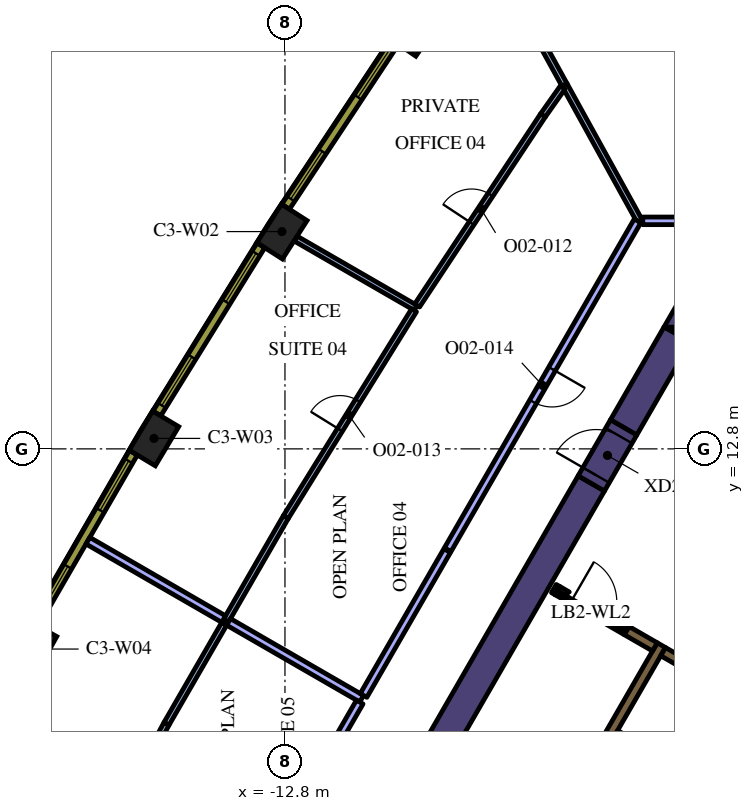
"""IFC4 building model, lengths in metres.
Left out: names, types, materials, properties, quantities, classifications, styles, units other than length and angle.
Written with IfcOpenShell. Run it as: python <this file> out.ifc"""

import sys

from ifc_helpers import new_model, si_unit, direction, frame, frame_2d, origin, origin_2d, place, context, subcontext, project, spatial, polyline, rectangle, outline, extrude, element, fill, save


model = new_model("IFC4")
c1 = context("Model", 3, precision=1e-05, world=origin(), true_north=direction((0.0, 1.0)))
c2 = subcontext(c1, "Body", "Model", "MODEL_VIEW")
j1 = project(units=[si_unit("LENGTHUNIT", "METRE"), si_unit("PLANEANGLEUNIT", "RADIAN")], contexts=[c1])
p1 = place(None, origin())
s1 = spatial("IfcSite", under=j1, at=p1, CompositionType="ELEMENT")
p2 = place(p1, origin())
s2 = spatial("IfcBuilding", under=s1, at=p2, CompositionType="ELEMENT")
p3 = place(p2, frame((0.0, 0.0, 162.6)))
s3 = spatial("IfcBuildingStorey", under=s2, at=p3, CompositionType="ELEMENT", Elevation=162.6)
for number, where, z_axis, x_axis in (
    (1, (-9.348, 23.854, 0.0), (0.0, 0.0, 1.0), (-0.565, -0.825, 0.0)),
    (2, (-12.88, 18.517, 0.0), (0.0, 0.0, 1.0), (-0.539, -0.842, 0.0)),
    (3, (-16.247, 13.075, 0.0), (0.0, 0.0, 1.0), (-0.513, -0.858, 0.0)),
    (4, (-19.447, 7.533, 0.0), (0.0, 0.0, 1.0), (-0.487, -0.874, 0.0)),
):
    element("IfcColumn", number, at=place(p3, frame(where, z_axis=z_axis, x_axis=x_axis)), inside=s3, PredefinedType="COLUMN", context=c2, shape_type="SweptSolid", body=[
        extrude(rectangle(XDim=1.2, YDim=0.8, at=origin_2d()), origin(), (0.0, 0.0, 1.0), 4.2),
    ])
p4 = place(p3, origin())
e5 = element("IfcWall", 5, at=p4, inside=s3, PredefinedType="SOLIDWALL", context=c2, shape_type="SweptSolid", body=[
    extrude(outline(polyline([(-2.829, 16.0), (-2.381, 16.776), (-2.381, 16.0), (-2.829, 16.0)])), origin(), (0.0, 0.0, 1.0), 4.2),
])
p5 = place(p3, frame((-2.477, 15.81, 0.0), z_axis=(0.0, 0.0, 1.0), x_axis=(-0.499969377405, -0.866043083026, 0.0)))
e6 = element("IfcWall", 6, at=p5, inside=s3, PredefinedType="SOLIDWALL", context=c2, shape_type="SweptSolid", body=[
    extrude(rectangle(XDim=2.824, YDim=0.8, at=frame_2d((1.412, 0.0))), origin(), (0.0, 0.0, 1.0), 4.2),
])
e7 = element("IfcWall", 7, at=p4, inside=s3, PredefinedType="SOLIDWALL", context=c2, shape_type="SweptSolid", body=[
    extrude(outline(polyline([(-1.905, 16.0), (-2.129, 15.612), (-2.801, 16.0), (-1.905, 16.0)])), origin(), (0.0, 0.0, 1.0), 4.2),
])
p6 = place(p3, frame((-12.668, -1.842, 0.0), z_axis=(0.0, 0.0, 1.0), x_axis=(0.500003640647, 0.866023301845, 0.0)))
e8 = element("IfcWall", 8, at=p6, inside=s3, PredefinedType="SOLIDWALL", context=c2, shape_type="SweptSolid", body=[
    extrude(rectangle(XDim=15.858, YDim=0.8, at=frame_2d((7.929, 0.0))), origin(), (0.0, 0.0, 1.0), 4.2),
])
p7 = place(p3, frame((-8.06, -1.311, 0.0), z_axis=(0.0, 0.0, 1.0), x_axis=(0.50000273126, 0.866023826885, 0.0)))
e9 = element("IfcWall", 9, at=p7, inside=s3, PredefinedType="SOLIDWALL", context=c2, shape_type="SweptSolid", body=[
    extrude(rectangle(XDim=10.33, YDim=0.25, at=frame_2d((5.165, 0.0))), origin(), (0.0, 0.0, 1.0), 4.2),
])
p8 = place(p3, frame((-1.76, 6.836, 0.0), z_axis=(0.0, 0.0, 1.0), x_axis=(-0.865952863304, 0.500125622755, 0.0)))
e10 = element("IfcWall", 10, at=p8, inside=s3, PredefinedType="SOLIDWALL", context=c2, shape_type="SweptSolid", body=[
    extrude(rectangle(XDim=1.258, YDim=0.25, at=frame_2d((0.629, 0.0))), origin(), (0.0, 0.0, 1.0), 4.2),
])
p9 = place(p3, frame((-2.204, 4.182, 0.0), z_axis=(0.0, 0.0, 1.0), x_axis=(-0.866008176907, 0.50002983664, 0.0)))
e11 = element("IfcWall", 11, at=p9, inside=s3, PredefinedType="SOLIDWALL", context=c2, shape_type="SweptSolid", body=[
    extrude(rectangle(XDim=2.2, YDim=0.25, at=frame_2d((1.1, 0.0))), origin(), (0.0, 0.0, 1.0), 4.2),
])
p10 = place(p3, frame((-5.725, 9.125, 0.0), z_axis=(0.0, 0.0, 1.0), x_axis=(0.866185586049, -0.49972245349, 0.0)))
e12 = element("IfcWall", 12, at=p10, inside=s3, PredefinedType="SOLIDWALL", context=c2, shape_type="SweptSolid", body=[
    extrude(rectangle(XDim=0.11, YDim=0.25, at=frame_2d((0.055, 0.0))), origin(), (0.0, 0.0, 1.0), 4.2),
])
p11 = place(p3, frame((-3.066, 7.59, 0.0), z_axis=(0.0, 0.0, 1.0), x_axis=(-0.866081358704, 0.49990307071, 0.0)))
e13 = element("IfcWall", 13, at=p11, inside=s3, PredefinedType="SOLIDWALL", context=c2, shape_type="SweptSolid", body=[
    extrude(rectangle(XDim=0.858, YDim=0.25, at=frame_2d((0.429, 0.0))), origin(), (0.0, 0.0, 1.0), 4.2),
])
e14 = element("IfcWall", 14, at=p4, inside=s3, PredefinedType="SOLIDWALL", context=c2, shape_type="SweptSolid", body=[
    extrude(outline(polyline([(-3.748, 8.128), (-3.813, 8.015), (-4.027, 8.139), (-4.017, 8.156), (-4.008, 8.173), (-4.0, 8.192), (-3.995, 8.21), (-3.991, 8.23), (-3.99, 8.25), (-3.99, 8.268), (-3.748, 8.128)])), origin(), (0.0, 0.0, 1.0), 4.2),
])
e15 = element("IfcWall", 15, at=p4, inside=s3, PredefinedType="SOLIDWALL", context=c2, shape_type="SweptSolid", body=[
    extrude(outline(polyline([(-5.689, 8.96), (-5.69, 8.961), (-5.565, 9.177), (-5.319, 9.035), (-5.335, 9.026), (-5.351, 9.015), (-5.366, 9.002), (-5.379, 8.988), (-5.392, 8.972), (-5.402, 8.956), (-5.412, 8.939), (-5.629, 9.064), (-5.629, 9.064), (-5.689, 8.96)])), origin(), (0.0, 0.0, 1.0), 4.2),
])
p12 = place(p3, frame((-0.898, 6.194, 0.0), z_axis=(0.0, 0.0, 1.0), x_axis=(-0.499996202215, -0.866027596426, 0.0)))
e16 = element("IfcWall", 16, at=p12, inside=s3, PredefinedType="SOLIDWALL", context=c2, shape_type="SweptSolid", body=[
    extrude(rectangle(XDim=9.83, YDim=0.25, at=frame_2d((4.915, 0.0))), origin(), (0.0, 0.0, 1.0), 4.2),
])
p13 = place(p12, frame((0.585, 0.0, 0.0)))
e17 = element("IfcOpeningElement", 17, at=p13, cuts=e16, PredefinedType="OPENING", context=c2, shape_type="SweptSolid", body=[
    extrude(rectangle(XDim=1.1, YDim=2.1, at=frame_2d((0.55, 1.05))), frame((0.0, 0.135, 0.0), z_axis=(0.0, -1.0, 0.0), x_axis=(1.0, 0.0, 0.0)), (0.0, 0.0, 1.0), 0.27),
])
p14 = place(p12, frame((3.105, 0.0, 0.0)))
e18 = element("IfcOpeningElement", 18, at=p14, cuts=e16, PredefinedType="OPENING", context=c2, shape_type="SweptSolid", body=[
    extrude(rectangle(XDim=1.1, YDim=2.1, at=frame_2d((0.55, 1.05))), frame((0.0, 0.135, 0.0), z_axis=(0.0, -1.0, 0.0), x_axis=(1.0, 0.0, 0.0)), (0.0, 0.0, 1.0), 0.27),
])
p15 = place(p12, frame((5.625, 0.0, 0.0)))
e19 = element("IfcOpeningElement", 19, at=p15, cuts=e16, PredefinedType="OPENING", context=c2, shape_type="SweptSolid", body=[
    extrude(rectangle(XDim=1.1, YDim=2.1, at=frame_2d((0.55, 1.05))), frame((0.0, 0.135, 0.0), z_axis=(0.0, -1.0, 0.0), x_axis=(1.0, 0.0, 0.0)), (0.0, 0.0, 1.0), 0.27),
])
p16 = place(p12, frame((8.145, 0.0, 0.0)))
e20 = element("IfcOpeningElement", 20, at=p16, cuts=e16, PredefinedType="OPENING", context=c2, shape_type="SweptSolid", body=[
    extrude(rectangle(XDim=1.1, YDim=2.1, at=frame_2d((0.55, 1.05))), frame((0.0, 0.135, 0.0), z_axis=(0.0, -1.0, 0.0), x_axis=(1.0, 0.0, 0.0)), (0.0, 0.0, 1.0), 0.27),
])
p17 = place(p3, frame((-5.659, 9.012, 0.0), z_axis=(0.0, 0.0, 1.0), x_axis=(0.866009402589, -0.500027713859, 0.0)))
e21 = element("IfcWall", 21, at=p17, inside=s3, PredefinedType="PARTITIONING", context=c2, shape_type="SweptSolid", body=[
    extrude(rectangle(XDim=2.1, YDim=0.12, at=frame_2d((1.05, 0.0))), origin(), (0.0, 0.0, 1.0), 3.15),
])
p18 = place(p17, frame((0.45, 0.0, 0.0)))
e22 = element("IfcOpeningElement", 22, at=p18, cuts=e21, PredefinedType="OPENING", context=c2, shape_type="SweptSolid", body=[
    extrude(rectangle(XDim=1.2, YDim=2.1, at=frame_2d((0.6, 1.05))), frame((0.0, 0.07, 0.0), z_axis=(0.0, -1.0, 0.0), x_axis=(1.0, 0.0, 0.0)), (0.0, 0.0, 1.0), 0.14),
])
p19 = place(p3, frame((-4.739, 11.892, 0.0), z_axis=(0.0, 0.0, 1.0), x_axis=(0.500062241894, 0.865989465428, 0.0)))
e23 = element("IfcWall", 23, at=p19, inside=s3, PredefinedType="SOLIDWALL", context=c2, shape_type="SweptSolid", body=[
    extrude(rectangle(XDim=1.7, YDim=0.8, at=frame_2d((0.85, 0.0))), origin(), (0.0, 0.0, 1.0), 4.2),
])
p20 = place(p19, frame((0.25, 0.0, 0.0)))
e24 = element("IfcOpeningElement", 24, at=p20, cuts=e23, PredefinedType="OPENING", context=c2, shape_type="SweptSolid", body=[
    extrude(rectangle(XDim=1.2, YDim=2.1, at=frame_2d((0.6, 1.05))), frame((0.0, 0.41, 0.0), z_axis=(0.0, -1.0, 0.0), x_axis=(1.0, 0.0, 0.0)), (0.0, 0.0, 1.0), 0.82),
])
p21 = place(p3, frame((-5.442, 22.374, 0.0), z_axis=(0.0, 0.0, 1.0), x_axis=(-0.482987550425, 0.875627218703, 0.0)))
e25 = element("IfcWall", 25, at=p21, inside=s3, PredefinedType="PARTITIONING", context=c2, shape_type="SweptSolid", body=[
    extrude(rectangle(XDim=4.672, YDim=0.15, at=frame_2d((2.336, 0.0))), origin(), (0.0, 0.0, 1.0), 3.15),
])
p22 = place(p3, frame((-3.47, 18.8, 0.0), z_axis=(0.0, 0.0, 1.0), x_axis=(-0.482974768035, 0.875634269225, 0.0)))
e26 = element("IfcWall", 26, at=p22, inside=s3, PredefinedType="PARTITIONING", context=c2, shape_type="SweptSolid", body=[
    extrude(rectangle(XDim=4.09, YDim=0.15, at=frame_2d((2.045, 0.0))), origin(), (0.0, 0.0, 1.0), 3.15),
])
p23 = place(p3, frame((-1.23, 18.8, 0.0), z_axis=(0.0, 0.0, 1.0), x_axis=(-1.0, 0.0, 0.0)))
e27 = element("IfcWall", 27, at=p23, inside=s3, PredefinedType="PARTITIONING", context=c2, shape_type="SweptSolid", body=[
    extrude(rectangle(XDim=2.155, YDim=0.2, at=frame_2d((1.077, 0.0))), origin(), (0.0, 0.0, 1.0), 3.15),
])
p24 = place(p3, frame((-9.363, 16.511, 0.0), z_axis=(0.0, 0.0, 1.0), x_axis=(-0.866006134298, 0.500033374244, 0.0)))
e28 = element("IfcWall", 28, at=p24, inside=s3, PredefinedType="PARTITIONING", context=c2, shape_type="SweptSolid", body=[
    extrude(rectangle(XDim=3.648, YDim=0.15, at=frame_2d((1.824, 0.0))), origin(), (0.0, 0.0, 1.0), 3.15),
])
p25 = place(p3, frame((-5.492, 22.31, 0.0), z_axis=(0.0, 0.0, 1.0), x_axis=(-0.576980663571, -0.816757806124, 0.0)))
e29 = element("IfcWall", 29, at=p25, inside=s3, PredefinedType="PARTITIONING", context=c2, shape_type="SweptSolid", body=[
    extrude(rectangle(XDim=0.902, YDim=0.15, at=frame_2d((0.451, 0.0))), origin(), (0.0, 0.0, 1.0), 3.15),
])
p26 = place(p3, frame((-9.322, 16.573, 0.0), z_axis=(0.0, 0.0, 1.0), x_axis=(0.551906048292, 0.833906298009, 0.0)))
e30 = element("IfcWall", 30, at=p26, inside=s3, PredefinedType="PARTITIONING", context=c2, shape_type="SweptSolid", body=[
    extrude(rectangle(XDim=5.995, YDim=0.15, at=frame_2d((2.998, 0.0))), origin(), (0.0, 0.0, 1.0), 3.15),
])
p27 = place(p26, frame((2.595, 0.0, 0.0)))
e31 = element("IfcOpeningElement", 31, at=p27, cuts=e30, PredefinedType="OPENING", context=c2, shape_type="SweptSolid", body=[
    extrude(rectangle(XDim=0.9, YDim=2.1, at=frame_2d((0.45, 1.05))), frame((0.0, 0.085, 0.0), z_axis=(0.0, -1.0, 0.0), x_axis=(1.0, 0.0, 0.0)), (0.0, 0.0, 1.0), 0.17),
])
p28 = place(p3, frame((-12.779, 11.002, 0.0), z_axis=(0.0, 0.0, 1.0), x_axis=(0.527026092571, 0.849849102929, 0.0)))
e32 = element("IfcWall", 32, at=p28, inside=s3, PredefinedType="PARTITIONING", context=c2, shape_type="SweptSolid", body=[
    extrude(rectangle(XDim=6.407, YDim=0.15, at=frame_2d((3.204, 0.0))), origin(), (0.0, 0.0, 1.0), 3.15),
])
p29 = place(p28, frame((2.707, 0.0, 0.0)))
e33 = element("IfcOpeningElement", 33, at=p29, cuts=e32, PredefinedType="OPENING", context=c2, shape_type="SweptSolid", body=[
    extrude(rectangle(XDim=0.9, YDim=2.1, at=frame_2d((0.45, 1.05))), frame((0.0, 0.085, 0.0), z_axis=(0.0, -1.0, 0.0), x_axis=(1.0, 0.0, 0.0)), (0.0, 0.0, 1.0), 0.17),
])
p30 = place(p3, frame((-12.779, 11.002, 0.0), z_axis=(0.0, 0.0, 1.0), x_axis=(-0.499996312652, -0.866027532665, 0.0)))
e34 = element("IfcWall", 34, at=p30, inside=s3, PredefinedType="PARTITIONING", context=c2, shape_type="SweptSolid", body=[
    extrude(rectangle(XDim=3.138, YDim=0.15, at=frame_2d((1.569, 0.0))), origin(), (0.0, 0.0, 1.0), 3.15),
])
p31 = place(p3, frame((-14.413, 8.322, 0.0), z_axis=(0.0, 0.0, 1.0), x_axis=(-0.866034795751, 0.499983732284, 0.0)))
e35 = element("IfcWall", 35, at=p31, inside=s3, PredefinedType="PARTITIONING", context=c2, shape_type="SweptSolid", body=[
    extrude(rectangle(XDim=4.125, YDim=0.2, at=frame_2d((2.062, 0.0))), origin(), (0.0, 0.0, 1.0), 3.15),
])
p32 = place(p3, frame((-10.782, 6.225, 0.0), z_axis=(0.0, 0.0, 1.0), x_axis=(-0.866034752867, 0.499983806564, 0.0)))
e36 = element("IfcWall", 36, at=p32, inside=s3, PredefinedType="PARTITIONING", context=c2, shape_type="SweptSolid", body=[
    extrude(rectangle(XDim=4.043, YDim=0.2, at=frame_2d((2.021, 0.0))), origin(), (0.0, 0.0, 1.0), 3.15),
])
p33 = place(p3, frame((-8.532, 10.122, 0.0), z_axis=(0.0, 0.0, 1.0), x_axis=(-0.499988222896, -0.866032203192, 0.0)))
e37 = element("IfcWall", 37, at=p33, inside=s3, PredefinedType="PARTITIONING", context=c2, shape_type="SweptSolid", body=[
    extrude(rectangle(XDim=4.4, YDim=0.2, at=frame_2d((2.2, 0.0))), origin(), (0.0, 0.0, 1.0), 3.15),
])
p34 = place(p3, frame((-3.522, 18.8, 0.0), z_axis=(0.0, 0.0, 1.0), x_axis=(-0.500015783377, -0.866016291056, 0.0)))
e38 = element("IfcWall", 38, at=p34, inside=s3, PredefinedType="PARTITIONING", context=c2, shape_type="SweptSolid", body=[
    extrude(rectangle(XDim=9.99, YDim=0.2, at=frame_2d((4.995, 0.0))), origin(), (0.0, 0.0, 1.0), 3.15),
])
p35 = place(p34, frame((4.5, 0.0, 0.0)))
e39 = element("IfcOpeningElement", 39, at=p35, cuts=e38, PredefinedType="OPENING", context=c2, shape_type="SweptSolid", body=[
    extrude(rectangle(XDim=1.0, YDim=2.1, at=frame_2d((0.5, 1.05))), frame((0.0, 0.11, 0.0), z_axis=(0.0, -1.0, 0.0), x_axis=(1.0, 0.0, 0.0)), (0.0, 0.0, 1.0), 0.22),
])
p36 = place(p3, frame((-14.398, 8.198, 0.0), z_axis=(0.0, 0.0, 1.0), x_axis=(-0.499993740961, -0.866029017412, 0.0)))
e40 = element("IfcWall", 40, at=p36, inside=s3, PredefinedType="PARTITIONING", context=c2, shape_type="SweptSolid", body=[
    extrude(rectangle(XDim=3.038, YDim=0.15, at=frame_2d((1.519, 0.0))), origin(), (0.0, 0.0, 1.0), 3.15),
])
p37 = place(p3, frame((-18.945, -0.081, 0.0), z_axis=(0.0, 0.0, 1.0), x_axis=(0.472485737981, 0.881338316088, 0.0)))
e41 = element("IfcWall", 41, at=p37, inside=s3, PredefinedType="PARTITIONING", context=c2, shape_type="SweptSolid", body=[
    extrude(rectangle(XDim=6.407, YDim=0.15, at=frame_2d((3.204, 0.0))), origin(), (0.0, 0.0, 1.0), 3.15),
])
p38 = place(p37, frame((2.707, 0.0, 0.0)))
e42 = element("IfcOpeningElement", 42, at=p38, cuts=e41, PredefinedType="OPENING", context=c2, shape_type="SweptSolid", body=[
    extrude(rectangle(XDim=0.9, YDim=2.1, at=frame_2d((0.45, 1.05))), frame((0.0, 0.085, 0.0), z_axis=(0.0, -1.0, 0.0), x_axis=(1.0, 0.0, 0.0)), (0.0, 0.0, 1.0), 0.17),
])
p39 = place(p3, frame((-10.832, 6.138, 0.0), z_axis=(0.0, 0.0, 1.0), x_axis=(-0.499988222896, -0.866032203192, 0.0)))
e43 = element("IfcWall", 43, at=p39, inside=s3, PredefinedType="PARTITIONING", context=c2, shape_type="SweptSolid", body=[
    extrude(rectangle(XDim=4.4, YDim=0.2, at=frame_2d((2.2, 0.0))), origin(), (0.0, 0.0, 1.0), 3.15),
])
p40 = place(p3, frame((-9.911, 23.51, 0.0), z_axis=(0.0, 0.0, 1.0), x_axis=(-0.551892811511, -0.833915058386, 0.0)))
e44 = element("IfcWall", 44, at=p40, inside=s3, PredefinedType="SOLIDWALL", context=c2, shape_type="SweptSolid", body=[
    extrude(rectangle(XDim=5.204, YDim=0.24, at=frame_2d((2.602, 0.0))), origin(), (0.0, 0.0, 1.0), 3.95),
])
p41 = place(p40, frame((0.248, 0.0, 0.9)))
e45 = element("IfcOpeningElement", 45, at=p41, cuts=e44, PredefinedType="OPENING", context=c2, shape_type="SweptSolid", body=[
    extrude(rectangle(XDim=1.5, YDim=2.55, at=frame_2d((0.75, 1.275))), frame((0.0, 0.13, 0.0), z_axis=(0.0, -1.0, 0.0), x_axis=(1.0, 0.0, 0.0)), (0.0, 0.0, 1.0), 0.26),
])
p42 = place(p40, frame((3.455, 0.0, 0.9)))
e46 = element("IfcOpeningElement", 46, at=p42, cuts=e44, PredefinedType="OPENING", context=c2, shape_type="SweptSolid", body=[
    extrude(rectangle(XDim=1.5, YDim=2.55, at=frame_2d((0.75, 1.275))), frame((0.0, 0.13, 0.0), z_axis=(0.0, -1.0, 0.0), x_axis=(1.0, 0.0, 0.0)), (0.0, 0.0, 1.0), 0.26),
])
p43 = place(p3, frame((-13.433, 18.156, 0.0), z_axis=(0.0, 0.0, 1.0), x_axis=(-0.526197926587, -0.850362124072, 0.0)))
e47 = element("IfcWall", 47, at=p43, inside=s3, PredefinedType="SOLIDWALL", context=c2, shape_type="SweptSolid", body=[
    extrude(rectangle(XDim=5.203, YDim=0.24, at=frame_2d((2.602, 0.0))), origin(), (0.0, 0.0, 1.0), 3.95),
])
p44 = place(p43, frame((0.248, 0.0, 0.9)))
e48 = element("IfcOpeningElement", 48, at=p44, cuts=e47, PredefinedType="OPENING", context=c2, shape_type="SweptSolid", body=[
    extrude(rectangle(XDim=1.5, YDim=2.55, at=frame_2d((0.75, 1.275))), frame((0.0, 0.13, 0.0), z_axis=(0.0, -1.0, 0.0), x_axis=(1.0, 0.0, 0.0)), (0.0, 0.0, 1.0), 0.26),
])
p45 = place(p43, frame((3.455, 0.0, 0.9)))
e49 = element("IfcOpeningElement", 49, at=p45, cuts=e47, PredefinedType="OPENING", context=c2, shape_type="SweptSolid", body=[
    extrude(rectangle(XDim=1.5, YDim=2.55, at=frame_2d((0.75, 1.275))), frame((0.0, 0.13, 0.0), z_axis=(0.0, -1.0, 0.0), x_axis=(1.0, 0.0, 0.0)), (0.0, 0.0, 1.0), 0.26),
])
p46 = place(p3, frame((-16.789, 12.697, 0.0), z_axis=(0.0, 0.0, 1.0), x_axis=(-0.500009456303, -0.866019944116, 0.0)))
e50 = element("IfcWall", 50, at=p46, inside=s3, PredefinedType="SOLIDWALL", context=c2, shape_type="SweptSolid", body=[
    extrude(rectangle(XDim=5.204, YDim=0.24, at=frame_2d((2.602, 0.0))), origin(), (0.0, 0.0, 1.0), 3.95),
])
p47 = place(p46, frame((0.248, 0.0, 0.9)))
e51 = element("IfcOpeningElement", 51, at=p47, cuts=e50, PredefinedType="OPENING", context=c2, shape_type="SweptSolid", body=[
    extrude(rectangle(XDim=1.5, YDim=2.55, at=frame_2d((0.75, 1.275))), frame((0.0, 0.13, 0.0), z_axis=(0.0, -1.0, 0.0), x_axis=(1.0, 0.0, 0.0)), (0.0, 0.0, 1.0), 0.26),
])
p48 = place(p46, frame((3.455, 0.0, 0.9)))
e52 = element("IfcOpeningElement", 52, at=p48, cuts=e50, PredefinedType="OPENING", context=c2, shape_type="SweptSolid", body=[
    extrude(rectangle(XDim=1.5, YDim=2.55, at=frame_2d((0.75, 1.275))), frame((0.0, 0.13, 0.0), z_axis=(0.0, -1.0, 0.0), x_axis=(1.0, 0.0, 0.0)), (0.0, 0.0, 1.0), 0.26),
])
p49 = place(p18, origin())
e53 = element("IfcDoor", 53, at=p49, inside=s3, OperationType="SINGLE_SWING_LEFT", PredefinedType="DOOR", context=c2, shape_type="SweptSolid", body=[
    extrude(rectangle(XDim=1.2, YDim=2.1, at=frame_2d((0.6, 1.05))), frame((0.0, 0.025, 0.0), z_axis=(0.0, -1.0, 0.0), x_axis=(1.0, 0.0, 0.0)), (0.0, 0.0, 1.0), 0.05),
])
fill(e22, e53)
p50 = place(p20, origin())
e54 = element("IfcDoor", 54, at=p50, inside=s3, OperationType="SINGLE_SWING_LEFT", PredefinedType="DOOR", context=c2, shape_type="SweptSolid", body=[
    extrude(rectangle(XDim=1.2, YDim=2.1, at=frame_2d((0.6, 1.05))), frame((0.0, 0.025, 0.0), z_axis=(0.0, -1.0, 0.0), x_axis=(1.0, 0.0, 0.0)), (0.0, 0.0, 1.0), 0.05),
])
fill(e24, e54)
p51 = place(p27, origin())
e55 = element("IfcDoor", 55, at=p51, inside=s3, OperationType="SINGLE_SWING_RIGHT", PredefinedType="DOOR", context=c2, shape_type="SweptSolid", body=[
    extrude(rectangle(XDim=0.9, YDim=2.1, at=frame_2d((0.45, 1.05))), frame((0.0, 0.025, 0.0), z_axis=(0.0, -1.0, 0.0), x_axis=(1.0, 0.0, 0.0)), (0.0, 0.0, 1.0), 0.05),
])
fill(e31, e55)
p52 = place(p29, origin())
e56 = element("IfcDoor", 56, at=p52, inside=s3, OperationType="SINGLE_SWING_LEFT", PredefinedType="DOOR", context=c2, shape_type="SweptSolid", body=[
    extrude(rectangle(XDim=0.9, YDim=2.1, at=frame_2d((0.45, 1.05))), frame((0.0, 0.025, 0.0), z_axis=(0.0, -1.0, 0.0), x_axis=(1.0, 0.0, 0.0)), (0.0, 0.0, 1.0), 0.05),
])
fill(e33, e56)
p53 = place(p35, origin())
e57 = element("IfcDoor", 57, at=p53, inside=s3, OperationType="SINGLE_SWING_RIGHT", PredefinedType="DOOR", context=c2, shape_type="SweptSolid", body=[
    extrude(rectangle(XDim=1.0, YDim=2.1, at=frame_2d((0.5, 1.05))), frame((0.0, 0.025, 0.0), z_axis=(0.0, -1.0, 0.0), x_axis=(1.0, 0.0, 0.0)), (0.0, 0.0, 1.0), 0.05),
])
fill(e39, e57)
p54 = place(p41, origin())
e58 = element("IfcWindow", 58, at=p54, inside=s3, PartitioningType="SINGLE_PANEL", PredefinedType="WINDOW", context=c2, shape_type="SweptSolid", body=[
    extrude(rectangle(XDim=1.5, YDim=2.55, at=frame_2d((0.75, 1.275))), frame((0.0, 0.04, 0.0), z_axis=(0.0, -1.0, 0.0), x_axis=(1.0, 0.0, 0.0)), (0.0, 0.0, 1.0), 0.06),
])
fill(e45, e58)
p55 = place(p42, origin())
e59 = element("IfcWindow", 59, at=p55, inside=s3, PartitioningType="SINGLE_PANEL", PredefinedType="WINDOW", context=c2, shape_type="SweptSolid", body=[
    extrude(rectangle(XDim=1.5, YDim=2.55, at=frame_2d((0.75, 1.275))), frame((0.0, 0.04, 0.0), z_axis=(0.0, -1.0, 0.0), x_axis=(1.0, 0.0, 0.0)), (0.0, 0.0, 1.0), 0.06),
])
fill(e46, e59)
p56 = place(p44, origin())
e60 = element("IfcWindow", 60, at=p56, inside=s3, PartitioningType="SINGLE_PANEL", PredefinedType="WINDOW", context=c2, shape_type="SweptSolid", body=[
    extrude(rectangle(XDim=1.5, YDim=2.55, at=frame_2d((0.75, 1.275))), frame((0.0, 0.04, 0.0), z_axis=(0.0, -1.0, 0.0), x_axis=(1.0, 0.0, 0.0)), (0.0, 0.0, 1.0), 0.06),
])
fill(e48, e60)
p57 = place(p45, origin())
e61 = element("IfcWindow", 61, at=p57, inside=s3, PartitioningType="SINGLE_PANEL", PredefinedType="WINDOW", context=c2, shape_type="SweptSolid", body=[
    extrude(rectangle(XDim=1.5, YDim=2.55, at=frame_2d((0.75, 1.275))), frame((0.0, 0.04, 0.0), z_axis=(0.0, -1.0, 0.0), x_axis=(1.0, 0.0, 0.0)), (0.0, 0.0, 1.0), 0.06),
])
fill(e49, e61)
p58 = place(p47, origin())
e62 = element("IfcWindow", 62, at=p58, inside=s3, PartitioningType="SINGLE_PANEL", PredefinedType="WINDOW", context=c2, shape_type="SweptSolid", body=[
    extrude(rectangle(XDim=1.5, YDim=2.55, at=frame_2d((0.75, 1.275))), frame((0.0, 0.04, 0.0), z_axis=(0.0, -1.0, 0.0), x_axis=(1.0, 0.0, 0.0)), (0.0, 0.0, 1.0), 0.06),
])
fill(e51, e62)
p59 = place(p48, origin())
e63 = element("IfcWindow", 63, at=p59, inside=s3, PartitioningType="SINGLE_PANEL", PredefinedType="WINDOW", context=c2, shape_type="SweptSolid", body=[
    extrude(rectangle(XDim=1.5, YDim=2.55, at=frame_2d((0.75, 1.275))), frame((0.0, 0.04, 0.0), z_axis=(0.0, -1.0, 0.0), x_axis=(1.0, 0.0, 0.0)), (0.0, 0.0, 1.0), 0.06),
])
fill(e52, e63)
save(model, sys.argv[1])
